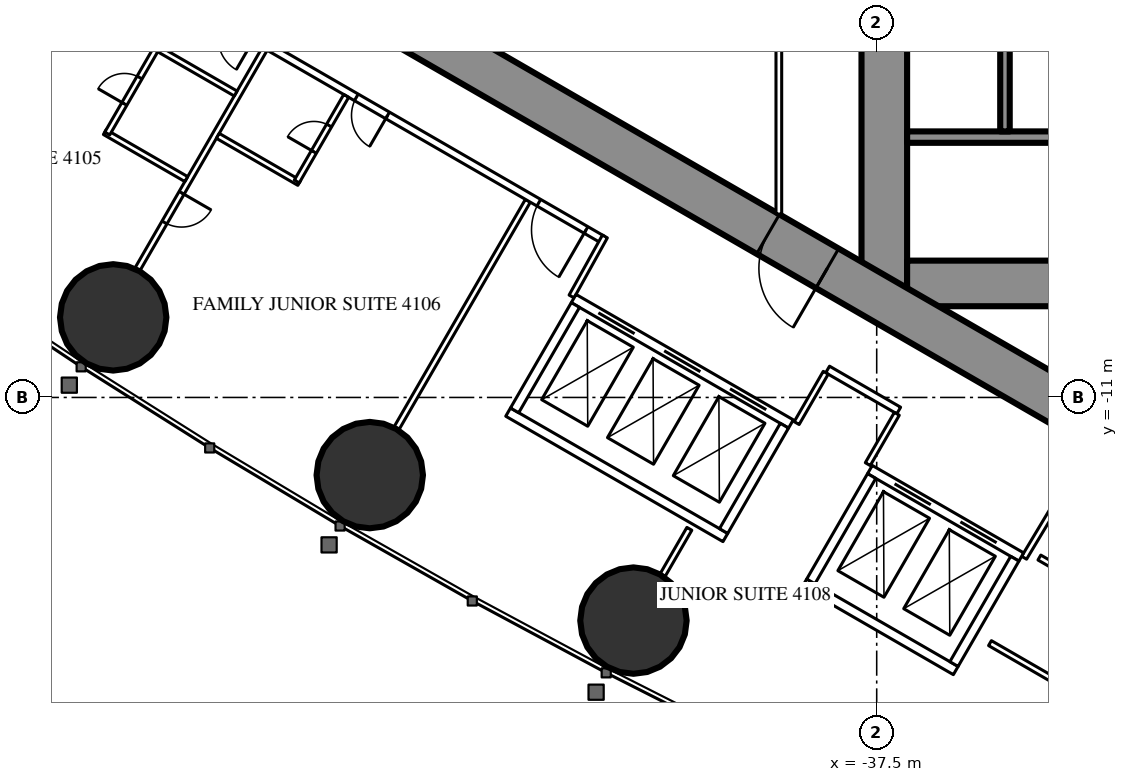
"""IFC4 building model, lengths in metres.
Left out: names, types, materials, properties, quantities, classifications, styles, units other than length and angle.
Written with IfcOpenShell. Run it as: python <this file> out.ifc"""

import sys

from ifc_helpers import new_model, si_unit, direction, frame, frame_2d, origin, origin_2d, place, context, subcontext, project, spatial, rectangle, circle, extrude, element, fill, save


model = new_model("IFC4")
c1 = context("Model", 3, precision=1e-05, world=origin(), true_north=direction((0.0, 1.0)))
c2 = subcontext(c1, "Body", "Model", "MODEL_VIEW")
j1 = project(units=[si_unit("LENGTHUNIT", "METRE"), si_unit("PLANEANGLEUNIT", "RADIAN")], contexts=[c1])
p1 = place(None, origin())
s1 = spatial("IfcSite", under=j1, at=p1, CompositionType="ELEMENT")
p2 = place(p1, origin())
s2 = spatial("IfcBuilding", under=s1, at=p2, CompositionType="ELEMENT")
p3 = place(p2, frame((0.0, 0.0, 156.3)))
s3 = spatial("IfcBuildingStorey", under=s2, at=p3, CompositionType="ELEMENT", Elevation=156.3)
for number, where, z_axis, x_axis in (
    (1, (-57.59, -8.893, 0.0), (0.0, 0.0, 1.0), (1.0, 0.0, 0.0)),
    (2, (-50.839, -13.043, 0.0), (0.0, 0.0, 1.0), (1.0, 0.0, 0.0)),
    (3, (-43.9, -16.871, 0.0), (0.0, 0.0, 1.0), (1.0, 0.0, 0.0)),
):
    element("IfcColumn", number, at=place(p3, frame(where, z_axis=z_axis, x_axis=x_axis)), inside=s3, PredefinedType="COLUMN", context=c2, shape_type="SweptSolid", body=[
        extrude(circle(Radius=1.4, at=origin_2d()), origin(), (0.0, 0.0, 1.0), 3.5),
    ])
p4 = place(p3, frame((-37.3, 8.6, 0.0), z_axis=(0.0, 0.0, 1.0), x_axis=(0.0, -1.0, 0.0)))
e4 = element("IfcWall", 4, at=p4, inside=s3, PredefinedType="SHEAR", context=c2, shape_type="SweptSolid", body=[
    extrude(rectangle(XDim=17.2, YDim=1.2, at=frame_2d((8.6, 0.0))), origin(), (0.0, 0.0, 1.0), 3.5),
])
p5 = place(p4, frame((7.7, 0.0, 0.0)))
e5 = element("IfcOpeningElement", 5, at=p5, cuts=e4, PredefinedType="OPENING", context=c2, shape_type="SweptSolid", body=[
    extrude(rectangle(XDim=1.8, YDim=2.2, at=frame_2d((0.9, 1.1))), frame((0.0, 0.61, 0.0), z_axis=(0.0, -1.0, 0.0), x_axis=(1.0, 0.0, 0.0)), (0.0, 0.0, 1.0), 1.22),
])
p6 = place(p3, frame((-28.3, -8.0, 0.0), z_axis=(0.0, 0.0, 1.0), x_axis=(-1.0, 0.0, 0.0)))
e6 = element("IfcWall", 6, at=p6, inside=s3, PredefinedType="SHEAR", context=c2, shape_type="SweptSolid", body=[
    extrude(rectangle(XDim=8.4, YDim=1.2, at=frame_2d((4.2, 0.0))), origin(), (0.0, 0.0, 1.0), 3.5),
])
p7 = place(p6, frame((0.25, 0.0, 0.0)))
e7 = element("IfcOpeningElement", 7, at=p7, cuts=e6, PredefinedType="OPENING", context=c2, shape_type="SweptSolid", body=[
    extrude(rectangle(XDim=1.0, YDim=2.2, at=frame_2d((0.5, 1.1))), frame((0.0, 0.61, 0.0), z_axis=(0.0, -1.0, 0.0), x_axis=(1.0, 0.0, 0.0)), (0.0, 0.0, 1.0), 1.22),
])
p8 = place(p3, frame((-28.3, -4.15, 0.0), z_axis=(0.0, 0.0, 1.0), x_axis=(-1.0, 0.0, 0.0)))
e8 = element("IfcWall", 8, at=p8, inside=s3, PredefinedType="SHEAR", context=c2, shape_type="SweptSolid", body=[
    extrude(rectangle(XDim=8.4, YDim=0.3, at=frame_2d((4.2, 0.0))), origin(), (0.0, 0.0, 1.0), 3.5),
])
p9 = place(p3, frame((-34.125, -1.65, 0.0), z_axis=(0.0, 0.0, 1.0), x_axis=(0.0, -1.0, 0.0)))
e9 = element("IfcWall", 9, at=p9, inside=s3, PredefinedType="SHEAR", context=c2, shape_type="SweptSolid", body=[
    extrude(rectangle(XDim=2.35, YDim=0.25, at=frame_2d((1.175, 0.0))), origin(), (0.0, 0.0, 1.0), 3.5),
])
p10 = place(p3, frame((-27.2, -14.3, 0.0), z_axis=(0.0, 0.0, 1.0), x_axis=(-0.866024021859, 0.500002393557, 0.0)))
e10 = element("IfcWall", 10, at=p10, inside=s3, PredefinedType="SHEAR", context=c2, shape_type="SweptSolid", body=[
    extrude(rectangle(XDim=27.907, YDim=1.2, at=frame_2d((13.954, 0.0))), origin(), (0.0, 0.0, 1.0), 3.5),
])
p11 = place(p10, frame((4.6, 0.0, 0.0)))
e11 = element("IfcOpeningElement", 11, at=p11, cuts=e10, PredefinedType="OPENING", context=c2, shape_type="SweptSolid", body=[
    extrude(rectangle(XDim=1.0, YDim=2.2, at=frame_2d((0.5, 1.1))), frame((0.0, 0.61, 0.0), z_axis=(0.0, -1.0, 0.0), x_axis=(1.0, 0.0, 0.0)), (0.0, 0.0, 1.0), 1.22),
])
p12 = place(p10, frame((13.395, 0.0, 0.0)))
e12 = element("IfcOpeningElement", 12, at=p12, cuts=e10, PredefinedType="OPENING", context=c2, shape_type="SweptSolid", body=[
    extrude(rectangle(XDim=1.8, YDim=2.2, at=frame_2d((0.9, 1.1))), frame((0.0, 0.61, 0.0), z_axis=(0.0, -1.0, 0.0), x_axis=(1.0, 0.0, 0.0)), (0.0, 0.0, 1.0), 1.22),
])
p13 = place(p3, frame((-46.679, -5.825, 0.0), z_axis=(0.0, 0.0, 1.0), x_axis=(-0.500006839597, -0.866021454905, 0.0)))
e13 = element("IfcWall", 13, at=p13, inside=s3, PredefinedType="PARTITIONING", context=c2, shape_type="SweptSolid", body=[
    extrude(rectangle(XDim=6.911, YDim=0.15, at=frame_2d((3.456, 0.0))), origin(), (0.0, 0.0, 1.0), 2.3),
])
p14 = place(p3, frame((-53.602, -1.828, 0.0), z_axis=(0.0, 0.0, 1.0), x_axis=(-0.49999191814, -0.866030069798, 0.0)))
e14 = element("IfcWall", 14, at=p14, inside=s3, PredefinedType="PARTITIONING", context=c2, shape_type="SweptSolid", body=[
    extrude(rectangle(XDim=6.692, YDim=0.15, at=frame_2d((3.346, 0.0))), origin(), (0.0, 0.0, 1.0), 2.3),
])
p15 = place(p14, frame((4.375, 0.0, 0.0)))
e15 = element("IfcOpeningElement", 15, at=p15, cuts=e14, PredefinedType="OPENING", context=c2, shape_type="SweptSolid", body=[
    extrude(rectangle(XDim=0.9, YDim=2.2, at=frame_2d((0.45, 1.1))), frame((0.0, 0.085, 0.0), z_axis=(0.0, -1.0, 0.0), x_axis=(1.0, 0.0, 0.0)), (0.0, 0.0, 1.0), 0.17),
])
p16 = place(p3, frame((-42.429, -14.457, 0.0), z_axis=(0.0, 0.0, 1.0), x_axis=(-0.5000578829, -0.865991982497, 0.0)))
e16 = element("IfcWall", 16, at=p16, inside=s3, PredefinedType="PARTITIONING", context=c2, shape_type="SweptSolid", body=[
    extrude(rectangle(XDim=1.407, YDim=0.15, at=frame_2d((0.704, 0.0))), origin(), (0.0, 0.0, 1.0), 3.25),
])
p17 = place(p3, frame((-36.92, -11.344, 0.0), z_axis=(0.0, 0.0, 1.0), x_axis=(-0.866065156741, 0.499931139538, 0.0)))
e17 = element("IfcWall", 17, at=p17, inside=s3, PredefinedType="PARTITIONING", context=c2, shape_type="SweptSolid", body=[
    extrude(rectangle(XDim=2.16, YDim=0.2, at=frame_2d((1.08, 0.0))), origin(), (0.0, 0.0, 1.0), 3.25),
])
p18 = place(p3, frame((-44.715, -6.844, 0.0), z_axis=(0.0, 0.0, 1.0), x_axis=(-0.866025261224, 0.500000246922, 0.0)))
e18 = element("IfcWall", 18, at=p18, inside=s3, PredefinedType="PARTITIONING", context=c2, shape_type="SweptSolid", body=[
    extrude(rectangle(XDim=13.567, YDim=0.2, at=frame_2d((6.783, 0.0))), origin(), (0.0, 0.0, 1.0), 3.25),
])
p19 = place(p18, frame((10.579, 0.0, 0.0)))
e19 = element("IfcOpeningElement", 19, at=p19, cuts=e18, PredefinedType="OPENING", context=c2, shape_type="SweptSolid", body=[
    extrude(rectangle(XDim=0.95, YDim=2.2, at=frame_2d((0.475, 1.1))), frame((0.0, 0.11, 0.0), z_axis=(0.0, -1.0, 0.0), x_axis=(1.0, 0.0, 0.0)), (0.0, 0.0, 1.0), 0.22),
])
p20 = place(p18, frame((6.529, 0.0, 0.0)))
e20 = element("IfcOpeningElement", 20, at=p20, cuts=e18, PredefinedType="OPENING", context=c2, shape_type="SweptSolid", body=[
    extrude(rectangle(XDim=0.95, YDim=2.2, at=frame_2d((0.475, 1.1))), frame((0.0, 0.11, 0.0), z_axis=(0.0, -1.0, 0.0), x_axis=(1.0, 0.0, 0.0)), (0.0, 0.0, 1.0), 0.22),
])
p21 = place(p18, frame((0.5, 0.0, 0.0)))
e21 = element("IfcOpeningElement", 21, at=p21, cuts=e18, PredefinedType="OPENING", context=c2, shape_type="SweptSolid", body=[
    extrude(rectangle(XDim=1.435, YDim=2.2, at=frame_2d((0.718, 1.1))), frame((0.0, 0.11, 0.0), z_axis=(0.0, -1.0, 0.0), x_axis=(1.0, 0.0, 0.0)), (0.0, 0.0, 1.0), 0.22),
])
for number, where, z_axis, x_axis in (
    (22, (-33.621, -15.218, 0.0), (0.0, 0.0, 1.0), (0.514, 0.858, 0.0)),
    (23, (-44.652, -6.764, 0.0), (0.0, 0.0, 1.0), (-0.485, -0.874, 0.0)),
):
    element("IfcWall", number, at=place(p3, frame(where, z_axis=z_axis, x_axis=x_axis)), inside=s3, PredefinedType="PARTITIONING", context=c2, shape_type="SweptSolid", body=[
        extrude(rectangle(XDim=1.805, YDim=0.15, at=frame_2d((0.903, 0.0))), origin(), (0.0, 0.0, 1.0), 3.25),
    ])
p22 = place(p3, frame((-36.97, -11.43, 0.0), z_axis=(0.0, 0.0, 1.0), x_axis=(-0.499985008713, -0.866034058835, 0.0)))
e24 = element("IfcWall", 24, at=p22, inside=s3, PredefinedType="PARTITIONING", context=c2, shape_type="SweptSolid", body=[
    extrude(rectangle(XDim=1.529, YDim=0.15, at=frame_2d((0.765, 0.0))), origin(), (0.0, 0.0, 1.0), 3.25),
])
p23 = place(p3, frame((-38.841, -10.35, 0.0), z_axis=(0.0, 0.0, 1.0), x_axis=(-0.499966498333, -0.866044745117, 0.0)))
e25 = element("IfcWall", 25, at=p23, inside=s3, PredefinedType="PARTITIONING", context=c2, shape_type="SweptSolid", body=[
    extrude(rectangle(XDim=1.53, YDim=0.15, at=frame_2d((0.765, 0.0))), origin(), (0.0, 0.0, 1.0), 3.25),
])
p24 = place(p3, frame((-55.667, -5.255, 0.0), z_axis=(0.0, 0.0, 1.0), x_axis=(-0.866006523861, 0.500032699561, 0.0)))
e26 = element("IfcWall", 26, at=p24, inside=s3, PredefinedType="PARTITIONING", context=c2, shape_type="SweptSolid", body=[
    extrude(rectangle(XDim=2.475, YDim=0.15, at=frame_2d((1.237, 0.0))), origin(), (0.0, 0.0, 1.0), 3.25),
])
p25 = place(p3, frame((-56.446, -1.803, 0.0), z_axis=(0.0, 0.0, 1.0), x_axis=(-0.499936506574, -0.866062058628, 0.0)))
e27 = element("IfcWall", 27, at=p25, inside=s3, PredefinedType="PARTITIONING", context=c2, shape_type="SweptSolid", body=[
    extrude(rectangle(XDim=2.6, YDim=0.15, at=frame_2d((1.3, 0.0))), origin(), (0.0, 0.0, 1.0), 3.25),
])
p26 = place(p25, frame((0.9, 0.0, 0.0)))
e28 = element("IfcOpeningElement", 28, at=p26, cuts=e27, PredefinedType="OPENING", context=c2, shape_type="SweptSolid", body=[
    extrude(rectangle(XDim=0.8, YDim=2.2, at=frame_2d((0.4, 1.1))), frame((0.0, 0.085, 0.0), z_axis=(0.0, -1.0, 0.0), x_axis=(1.0, 0.0, 0.0)), (0.0, 0.0, 1.0), 0.17),
])
for number, where, z_axis, x_axis in (
    (29, (-54.367, -3.003, 0.0), (0.0, 0.0, 1.0), (-0.866, 0.5, 0.0)),
    (30, (-52.694, -5.355, 0.0), (0.0, 0.0, 1.0), (-0.866, 0.5, 0.0)),
):
    element("IfcWall", number, at=place(p3, frame(where, z_axis=z_axis, x_axis=x_axis)), inside=s3, PredefinedType="PARTITIONING", context=c2, shape_type="SweptSolid", body=[
        extrude(rectangle(XDim=2.475, YDim=0.15, at=frame_2d((1.238, 0.0))), origin(), (0.0, 0.0, 1.0), 3.25),
    ])
p27 = place(p3, frame((-51.459, -3.065, 0.0), z_axis=(0.0, 0.0, 1.0), x_axis=(-0.499936506574, -0.866062058628, 0.0)))
e31 = element("IfcWall", 31, at=p27, inside=s3, PredefinedType="PARTITIONING", context=c2, shape_type="SweptSolid", body=[
    extrude(rectangle(XDim=2.6, YDim=0.15, at=frame_2d((1.3, 0.0))), origin(), (0.0, 0.0, 1.0), 3.25),
])
p28 = place(p27, frame((0.9, 0.0, 0.0)))
e32 = element("IfcOpeningElement", 32, at=p28, cuts=e31, PredefinedType="OPENING", context=c2, shape_type="SweptSolid", body=[
    extrude(rectangle(XDim=0.8, YDim=2.2, at=frame_2d((0.4, 1.1))), frame((0.0, 0.085, 0.0), z_axis=(0.0, -1.0, 0.0), x_axis=(1.0, 0.0, 0.0)), (0.0, 0.0, 1.0), 0.17),
])
p29 = place(p3, frame((-32.376, -18.702, 0.0), z_axis=(0.0, 0.0, 1.0), x_axis=(-0.866006523861, 0.500032699561, 0.0)))
e33 = element("IfcWall", 33, at=p29, inside=s3, PredefinedType="PARTITIONING", context=c2, shape_type="SweptSolid", body=[
    extrude(rectangle(XDim=2.475, YDim=0.15, at=frame_2d((1.237, 0.0))), origin(), (0.0, 0.0, 1.0), 3.25),
])
p30 = place(p3, frame((-31.076, -16.45, 0.0), z_axis=(0.0, 0.0, 1.0), x_axis=(-0.866073894602, 0.499916002032, 0.0)))
e34 = element("IfcWall", 34, at=p30, inside=s3, PredefinedType="PARTITIONING", context=c2, shape_type="SweptSolid", body=[
    extrude(rectangle(XDim=2.475, YDim=0.15, at=frame_2d((1.238, 0.0))), origin(), (0.0, 0.0, 1.0), 2.45),
])
p31 = place(p3, frame((-40.075, 6.174, 0.0), z_axis=(0.0, 0.0, 1.0), x_axis=(0.0, -1.0, 0.0)))
e35 = element("IfcWall", 35, at=p31, inside=s3, PredefinedType="PARTITIONING", context=c2, shape_type="SweptSolid", body=[
    extrude(rectangle(XDim=12.348, YDim=0.15, at=frame_2d((6.174, 0.0))), origin(), (0.0, 0.0, 1.0), 3.25),
])
p32 = place(p31, frame((5.274, 0.0, 0.0)))
e36 = element("IfcOpeningElement", 36, at=p32, cuts=e35, PredefinedType="OPENING", context=c2, shape_type="SweptSolid", body=[
    extrude(rectangle(XDim=1.8, YDim=2.2, at=frame_2d((0.9, 1.1))), frame((0.0, 0.085, 0.0), z_axis=(0.0, -1.0, 0.0), x_axis=(1.0, 0.0, 0.0)), (0.0, 0.0, 1.0), 0.17),
])
p33 = place(p3, frame((-33.696, -15.197, 0.0), z_axis=(0.0, 0.0, 1.0), x_axis=(-0.865976953817, 0.500083908417, 0.0)))
e37 = element("IfcWall", 37, at=p33, inside=s3, PredefinedType="PARTITIONING", context=c2, shape_type="SweptSolid", body=[
    extrude(rectangle(XDim=4.599, YDim=0.25, at=frame_2d((2.3, 0.0))), origin(), (0.0, 0.0, 1.0), 3.25),
])
p34 = place(p33, frame((0.75, 0.0, 0.0)))
e38 = element("IfcOpeningElement", 38, at=p34, cuts=e37, PredefinedType="OPENING", context=c2, shape_type="SweptSolid", body=[
    extrude(rectangle(XDim=1.1, YDim=2.2, at=frame_2d((0.55, 1.1))), frame((0.0, 0.135, 0.0), z_axis=(0.0, -1.0, 0.0), x_axis=(1.0, 0.0, 0.0)), (0.0, 0.0, 1.0), 0.27),
])
p35 = place(p33, frame((2.75, 0.0, 0.0)))
e39 = element("IfcOpeningElement", 39, at=p35, cuts=e37, PredefinedType="OPENING", context=c2, shape_type="SweptSolid", body=[
    extrude(rectangle(XDim=1.1, YDim=2.2, at=frame_2d((0.55, 1.1))), frame((0.0, 0.135, 0.0), z_axis=(0.0, -1.0, 0.0), x_axis=(1.0, 0.0, 0.0)), (0.0, 0.0, 1.0), 0.27),
])
p36 = place(p3, frame((-35.42, -18.186, 0.0), z_axis=(0.0, 0.0, 1.0), x_axis=(-0.865990227814, 0.50006092162, 0.0)))
e40 = element("IfcWall", 40, at=p36, inside=s3, PredefinedType="PARTITIONING", context=c2, shape_type="SweptSolid", body=[
    extrude(rectangle(XDim=4.6, YDim=0.25, at=frame_2d((2.3, 0.0))), origin(), (0.0, 0.0, 1.0), 3.25),
])
p37 = place(p3, frame((-33.866, -15.243, 0.0), z_axis=(0.0, 0.0, 1.0), x_axis=(-0.499929347863, -0.866066190972, 0.0)))
e41 = element("IfcWall", 41, at=p37, inside=s3, PredefinedType="PARTITIONING", context=c2, shape_type="SweptSolid", body=[
    extrude(rectangle(XDim=3.201, YDim=0.25, at=frame_2d((1.6, 0.0))), origin(), (0.0, 0.0, 1.0), 3.25),
])
p38 = place(p3, frame((-37.633, -13.068, 0.0), z_axis=(0.0, 0.0, 1.0), x_axis=(-0.499872130319, -0.866099216793, 0.0)))
e42 = element("IfcWall", 42, at=p38, inside=s3, PredefinedType="PARTITIONING", context=c2, shape_type="SweptSolid", body=[
    extrude(rectangle(XDim=3.2, YDim=0.25, at=frame_2d((1.6, 0.0))), origin(), (0.0, 0.0, 1.0), 3.25),
])
p39 = place(p3, frame((-39.758, -11.697, 0.0), z_axis=(0.0, 0.0, 1.0), x_axis=(-0.866024194504, 0.500002094529, 0.0)))
e43 = element("IfcWall", 43, at=p39, inside=s3, PredefinedType="PARTITIONING", context=c2, shape_type="SweptSolid", body=[
    extrude(rectangle(XDim=6.6, YDim=0.25, at=frame_2d((3.3, 0.0))), origin(), (0.0, 0.0, 1.0), 3.25),
])
p40 = place(p39, frame((0.75, 0.0, 0.0)))
e44 = element("IfcOpeningElement", 44, at=p40, cuts=e43, PredefinedType="OPENING", context=c2, shape_type="SweptSolid", body=[
    extrude(rectangle(XDim=1.1, YDim=2.2, at=frame_2d((0.55, 1.1))), frame((0.0, 0.135, 0.0), z_axis=(0.0, -1.0, 0.0), x_axis=(1.0, 0.0, 0.0)), (0.0, 0.0, 1.0), 0.27),
])
p41 = place(p39, frame((2.75, 0.0, 0.0)))
e45 = element("IfcOpeningElement", 45, at=p41, cuts=e43, PredefinedType="OPENING", context=c2, shape_type="SweptSolid", body=[
    extrude(rectangle(XDim=1.1, YDim=2.2, at=frame_2d((0.55, 1.1))), frame((0.0, 0.135, 0.0), z_axis=(0.0, -1.0, 0.0), x_axis=(1.0, 0.0, 0.0)), (0.0, 0.0, 1.0), 0.27),
])
p42 = place(p39, frame((4.75, 0.0, 0.0)))
e46 = element("IfcOpeningElement", 46, at=p42, cuts=e43, PredefinedType="OPENING", context=c2, shape_type="SweptSolid", body=[
    extrude(rectangle(XDim=1.1, YDim=2.2, at=frame_2d((0.55, 1.1))), frame((0.0, 0.135, 0.0), z_axis=(0.0, -1.0, 0.0), x_axis=(1.0, 0.0, 0.0)), (0.0, 0.0, 1.0), 0.27),
])
p43 = place(p3, frame((-41.482, -14.686, 0.0), z_axis=(0.0, 0.0, 1.0), x_axis=(-0.86603344179, 0.499986077507, 0.0)))
e47 = element("IfcWall", 47, at=p43, inside=s3, PredefinedType="PARTITIONING", context=c2, shape_type="SweptSolid", body=[
    extrude(rectangle(XDim=6.6, YDim=0.25, at=frame_2d((3.3, 0.0))), origin(), (0.0, 0.0, 1.0), 3.25),
])
for number, where, z_axis, x_axis in (
    (48, (-39.928, -11.743, 0.0), (0.0, 0.0, 1.0), (-0.5, -0.866, 0.0)),
    (49, (-45.428, -8.568, 0.0), (0.0, 0.0, 1.0), (-0.5, -0.866, 0.0)),
):
    element("IfcWall", number, at=place(p3, frame(where, z_axis=z_axis, x_axis=x_axis)), inside=s3, PredefinedType="PARTITIONING", context=c2, shape_type="SweptSolid", body=[
        extrude(rectangle(XDim=3.201, YDim=0.25, at=frame_2d((1.6, 0.0))), origin(), (0.0, 0.0, 1.0), 3.25),
    ])
p44 = place(p26, origin())
e50 = element("IfcDoor", 50, at=p44, inside=s3, OperationType="SINGLE_SWING_RIGHT", PredefinedType="DOOR", context=c2, shape_type="SweptSolid", body=[
    extrude(rectangle(XDim=0.8, YDim=2.2, at=frame_2d((0.4, 1.1))), frame((0.0, 0.025, 0.0), z_axis=(0.0, -1.0, 0.0), x_axis=(1.0, 0.0, 0.0)), (0.0, 0.0, 1.0), 0.05),
])
fill(e28, e50)
p45 = place(p28, origin())
e51 = element("IfcDoor", 51, at=p45, inside=s3, OperationType="SINGLE_SWING_RIGHT", PredefinedType="DOOR", context=c2, shape_type="SweptSolid", body=[
    extrude(rectangle(XDim=0.8, YDim=2.2, at=frame_2d((0.4, 1.1))), frame((0.0, 0.025, 0.0), z_axis=(0.0, -1.0, 0.0), x_axis=(1.0, 0.0, 0.0)), (0.0, 0.0, 1.0), 0.05),
])
fill(e32, e51)
p46 = place(p20, origin())
e52 = element("IfcDoor", 52, at=p46, inside=s3, OperationType="SINGLE_SWING_LEFT", PredefinedType="DOOR", context=c2, shape_type="SweptSolid", body=[
    extrude(rectangle(XDim=0.95, YDim=2.2, at=frame_2d((0.475, 1.1))), frame((0.0, 0.025, 0.0), z_axis=(0.0, -1.0, 0.0), x_axis=(1.0, 0.0, 0.0)), (0.0, 0.0, 1.0), 0.05),
])
fill(e20, e52)
p47 = place(p21, origin())
e53 = element("IfcDoor", 53, at=p47, inside=s3, OperationType="SINGLE_SWING_LEFT", PredefinedType="DOOR", context=c2, shape_type="SweptSolid", body=[
    extrude(rectangle(XDim=1.435, YDim=2.2, at=frame_2d((0.718, 1.1))), frame((0.0, 0.025, 0.0), z_axis=(0.0, -1.0, 0.0), x_axis=(1.0, 0.0, 0.0)), (0.0, 0.0, 1.0), 0.05),
])
fill(e21, e53)
p48 = place(p15, origin())
e54 = element("IfcDoor", 54, at=p48, inside=s3, OperationType="SINGLE_SWING_LEFT", PredefinedType="DOOR", context=c2, shape_type="SweptSolid", body=[
    extrude(rectangle(XDim=0.9, YDim=2.2, at=frame_2d((0.45, 1.1))), frame((0.0, 0.025, 0.0), z_axis=(0.0, -1.0, 0.0), x_axis=(1.0, 0.0, 0.0)), (0.0, 0.0, 1.0), 0.05),
])
fill(e15, e54)
p49 = place(p12, origin())
e55 = element("IfcDoor", 55, at=p49, inside=s3, OperationType="DOUBLE_DOOR_SINGLE_SWING", PredefinedType="DOOR", context=c2, shape_type="SweptSolid", body=[
    extrude(rectangle(XDim=1.8, YDim=2.2, at=frame_2d((0.9, 1.1))), frame((0.0, 0.025, 0.0), z_axis=(0.0, -1.0, 0.0), x_axis=(1.0, 0.0, 0.0)), (0.0, 0.0, 1.0), 0.05),
])
fill(e12, e55)
p50 = place(p34, origin())
e56 = element("IfcDoor", 56, at=p50, inside=s3, OperationType="DOUBLE_DOOR_SLIDING", PredefinedType="USERDEFINED", context=c2, shape_type="SweptSolid", body=[
    extrude(rectangle(XDim=1.1, YDim=2.2, at=frame_2d((0.55, 1.1))), frame((0.0, 0.025, 0.0), z_axis=(0.0, -1.0, 0.0), x_axis=(1.0, 0.0, 0.0)), (0.0, 0.0, 1.0), 0.05),
])
fill(e38, e56)
p51 = place(p35, origin())
e57 = element("IfcDoor", 57, at=p51, inside=s3, OperationType="DOUBLE_DOOR_SLIDING", PredefinedType="USERDEFINED", context=c2, shape_type="SweptSolid", body=[
    extrude(rectangle(XDim=1.1, YDim=2.2, at=frame_2d((0.55, 1.1))), frame((0.0, 0.025, 0.0), z_axis=(0.0, -1.0, 0.0), x_axis=(1.0, 0.0, 0.0)), (0.0, 0.0, 1.0), 0.05),
])
fill(e39, e57)
p52 = place(p40, origin())
e58 = element("IfcDoor", 58, at=p52, inside=s3, OperationType="DOUBLE_DOOR_SLIDING", PredefinedType="USERDEFINED", context=c2, shape_type="SweptSolid", body=[
    extrude(rectangle(XDim=1.1, YDim=2.2, at=frame_2d((0.55, 1.1))), frame((0.0, 0.025, 0.0), z_axis=(0.0, -1.0, 0.0), x_axis=(1.0, 0.0, 0.0)), (0.0, 0.0, 1.0), 0.05),
])
fill(e44, e58)
p53 = place(p41, origin())
e59 = element("IfcDoor", 59, at=p53, inside=s3, OperationType="DOUBLE_DOOR_SLIDING", PredefinedType="USERDEFINED", context=c2, shape_type="SweptSolid", body=[
    extrude(rectangle(XDim=1.1, YDim=2.2, at=frame_2d((0.55, 1.1))), frame((0.0, 0.025, 0.0), z_axis=(0.0, -1.0, 0.0), x_axis=(1.0, 0.0, 0.0)), (0.0, 0.0, 1.0), 0.05),
])
fill(e45, e59)
p54 = place(p42, origin())
e60 = element("IfcDoor", 60, at=p54, inside=s3, OperationType="DOUBLE_DOOR_SLIDING", PredefinedType="USERDEFINED", context=c2, shape_type="SweptSolid", body=[
    extrude(rectangle(XDim=1.1, YDim=2.2, at=frame_2d((0.55, 1.1))), frame((0.0, 0.025, 0.0), z_axis=(0.0, -1.0, 0.0), x_axis=(1.0, 0.0, 0.0)), (0.0, 0.0, 1.0), 0.05),
])
fill(e46, e60)
save(model, sys.argv[1])
